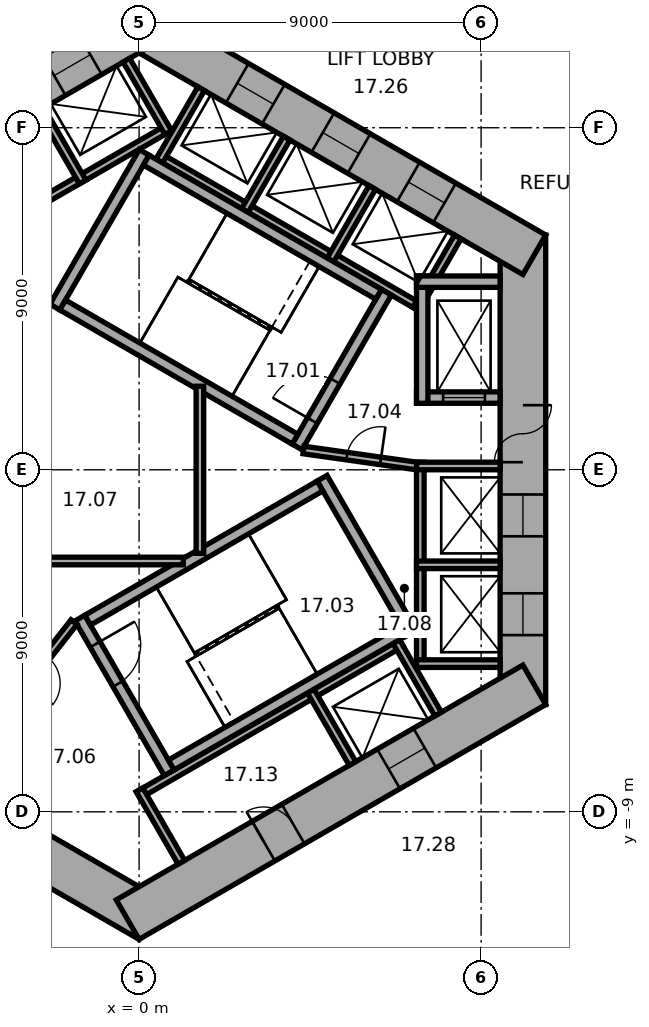
"""IFC4 building model, lengths in metres.
Left out: names, types, materials, properties, quantities, classifications, styles, units other than length and angle.
Written with IfcOpenShell. Run it as: python <this file> out.ifc"""

import sys

from ifc_helpers import new_model, si_unit, direction, frame, frame_2d, origin, place, context, subcontext, project, spatial, rectangle, extrude, element, fill, save


model = new_model("IFC4")
c1 = context("Model", 3, precision=1e-05, world=origin(), true_north=direction((0.0, 1.0)))
c2 = subcontext(c1, "Body", "Model", "MODEL_VIEW")
j1 = project(units=[si_unit("LENGTHUNIT", "METRE"), si_unit("PLANEANGLEUNIT", "RADIAN")], contexts=[c1])
p1 = place(None, origin())
s1 = spatial("IfcSite", under=j1, at=p1, CompositionType="ELEMENT")
p2 = place(p1, origin())
s2 = spatial("IfcBuilding", under=s1, at=p2, CompositionType="ELEMENT")
p3 = place(p2, frame((0.0, 0.0, 77.0)))
s3 = spatial("IfcBuildingStorey", under=s2, at=p3, CompositionType="ELEMENT", Elevation=77.0)
p4 = place(p3, frame((10.1, -6.177, 0.0), z_axis=(0.0, 0.0, 1.0), x_axis=(0.0, 1.0, 0.0)))
e1 = element("IfcWall", 1, at=p4, inside=s3, PredefinedType="SHEAR", context=c2, shape_type="SweptSolid", body=[
    extrude(rectangle(XDim=12.355, YDim=1.2, at=frame_2d((6.177, 0.0))), origin(), (0.0, 0.0, 1.0), 6.6),
])
p5 = place(p4, frame((6.378, 0.0, 0.0)))
e2 = element("IfcOpeningElement", 2, at=p5, cuts=e1, PredefinedType="OPENING", context=c2, shape_type="SweptSolid", body=[
    extrude(rectangle(XDim=1.5, YDim=2.1, at=frame_2d((0.75, 1.05))), frame((0.0, 0.61, 0.0), z_axis=(0.0, -1.0, 0.0), x_axis=(1.0, 0.0, 0.0)), (0.0, 0.0, 1.0), 1.22),
])
p6 = place(p4, frame((1.828, 0.0, 0.0)))
e3 = element("IfcOpeningElement", 3, at=p6, cuts=e1, PredefinedType="OPENING", context=c2, shape_type="SweptSolid", body=[
    extrude(rectangle(XDim=1.1, YDim=2.1, at=frame_2d((0.55, 1.05))), frame((0.0, 0.61, 0.0), z_axis=(0.0, -1.0, 0.0), x_axis=(1.0, 0.0, 0.0)), (0.0, 0.0, 1.0), 1.22),
])
p7 = place(p4, frame((4.427, 0.0, 0.0)))
e4 = element("IfcOpeningElement", 4, at=p7, cuts=e1, PredefinedType="OPENING", context=c2, shape_type="SweptSolid", body=[
    extrude(rectangle(XDim=1.1, YDim=2.1, at=frame_2d((0.55, 1.05))), frame((0.0, 0.61, 0.0), z_axis=(0.0, -1.0, 0.0), x_axis=(1.0, 0.0, 0.0)), (0.0, 0.0, 1.0), 1.22),
])
p8 = place(p3, frame((10.4, 5.658, 0.0), z_axis=(0.0, 0.0, 1.0), x_axis=(-0.866021384402, 0.500006961711, 0.0)))
e5 = element("IfcWall", 5, at=p8, inside=s3, PredefinedType="SHEAR", context=c2, shape_type="SweptSolid", body=[
    extrude(rectangle(XDim=12.355, YDim=1.2, at=frame_2d((6.178, 0.0))), origin(), (0.0, 0.0, 1.0), 6.6),
])
p9 = place(p8, frame((2.728, 0.0, 0.0)))
e6 = element("IfcOpeningElement", 6, at=p9, cuts=e5, PredefinedType="OPENING", context=c2, shape_type="SweptSolid", body=[
    extrude(rectangle(XDim=1.1, YDim=2.1, at=frame_2d((0.55, 1.05))), frame((0.0, 0.61, 0.0), z_axis=(0.0, -1.0, 0.0), x_axis=(1.0, 0.0, 0.0)), (0.0, 0.0, 1.0), 1.22),
])
p10 = place(p8, frame((5.328, 0.0, 0.0)))
e7 = element("IfcOpeningElement", 7, at=p10, cuts=e5, PredefinedType="OPENING", context=c2, shape_type="SweptSolid", body=[
    extrude(rectangle(XDim=1.1, YDim=2.1, at=frame_2d((0.55, 1.05))), frame((0.0, 0.61, 0.0), z_axis=(0.0, -1.0, 0.0), x_axis=(1.0, 0.0, 0.0)), (0.0, 0.0, 1.0), 1.22),
])
p11 = place(p8, frame((7.928, 0.0, 0.0)))
e8 = element("IfcOpeningElement", 8, at=p11, cuts=e5, PredefinedType="OPENING", context=c2, shape_type="SweptSolid", body=[
    extrude(rectangle(XDim=1.1, YDim=2.1, at=frame_2d((0.55, 1.05))), frame((0.0, 0.61, 0.0), z_axis=(0.0, -1.0, 0.0), x_axis=(1.0, 0.0, 0.0)), (0.0, 0.0, 1.0), 1.22),
])
p12 = place(p3, frame((0.3, 11.836, 0.0), z_axis=(0.0, 0.0, 1.0), x_axis=(-0.866021384402, -0.500006961711, 0.0)))
e9 = element("IfcWall", 9, at=p12, inside=s3, PredefinedType="SHEAR", context=c2, shape_type="SweptSolid", body=[
    extrude(rectangle(XDim=12.355, YDim=1.2, at=frame_2d((6.178, 0.0))), origin(), (0.0, 0.0, 1.0), 6.6),
])
p13 = place(p12, frame((6.378, 0.0, 0.0)))
e10 = element("IfcOpeningElement", 10, at=p13, cuts=e9, PredefinedType="OPENING", context=c2, shape_type="SweptSolid", body=[
    extrude(rectangle(XDim=1.5, YDim=2.1, at=frame_2d((0.75, 1.05))), frame((0.0, 0.61, 0.0), z_axis=(0.0, -1.0, 0.0), x_axis=(1.0, 0.0, 0.0)), (0.0, 0.0, 1.0), 1.22),
])
p14 = place(p12, frame((1.828, 0.0, 0.0)))
e11 = element("IfcOpeningElement", 11, at=p14, cuts=e9, PredefinedType="OPENING", context=c2, shape_type="SweptSolid", body=[
    extrude(rectangle(XDim=1.1, YDim=2.1, at=frame_2d((0.55, 1.05))), frame((0.0, 0.61, 0.0), z_axis=(0.0, -1.0, 0.0), x_axis=(1.0, 0.0, 0.0)), (0.0, 0.0, 1.0), 1.22),
])
p15 = place(p3, frame((-10.4, -5.658, 0.0), z_axis=(0.0, 0.0, 1.0), x_axis=(0.866021384402, -0.500006961711, 0.0)))
e12 = element("IfcWall", 12, at=p15, inside=s3, PredefinedType="SHEAR", context=c2, shape_type="SweptSolid", body=[
    extrude(rectangle(XDim=12.355, YDim=1.2, at=frame_2d((6.178, 0.0))), origin(), (0.0, 0.0, 1.0), 6.6),
])
p16 = place(p15, frame((6.378, 0.0, 0.0)))
e13 = element("IfcOpeningElement", 13, at=p16, cuts=e12, PredefinedType="OPENING", context=c2, shape_type="SweptSolid", body=[
    extrude(rectangle(XDim=1.5, YDim=2.1, at=frame_2d((0.75, 1.05))), frame((0.0, 0.61, 0.0), z_axis=(0.0, -1.0, 0.0), x_axis=(1.0, 0.0, 0.0)), (0.0, 0.0, 1.0), 1.22),
])
p17 = place(p15, frame((1.928, 0.0, 0.0)))
e14 = element("IfcOpeningElement", 14, at=p17, cuts=e12, PredefinedType="OPENING", context=c2, shape_type="SweptSolid", body=[
    extrude(rectangle(XDim=0.9, YDim=2.1, at=frame_2d((0.45, 1.05))), frame((0.0, 0.61, 0.0), z_axis=(0.0, -1.0, 0.0), x_axis=(1.0, 0.0, 0.0)), (0.0, 0.0, 1.0), 1.22),
])
p18 = place(p15, frame((4.528, 0.0, 0.0)))
e15 = element("IfcOpeningElement", 15, at=p18, cuts=e12, PredefinedType="OPENING", context=c2, shape_type="SweptSolid", body=[
    extrude(rectangle(XDim=0.9, YDim=2.1, at=frame_2d((0.45, 1.05))), frame((0.0, 0.61, 0.0), z_axis=(0.0, -1.0, 0.0), x_axis=(1.0, 0.0, 0.0)), (0.0, 0.0, 1.0), 1.22),
])
p19 = place(p3, frame((-0.3, -11.836, 0.0), z_axis=(0.0, 0.0, 1.0), x_axis=(0.866021384402, 0.500006961711, 0.0)))
e16 = element("IfcWall", 16, at=p19, inside=s3, PredefinedType="SHEAR", context=c2, shape_type="SweptSolid", body=[
    extrude(rectangle(XDim=12.355, YDim=1.2, at=frame_2d((6.178, 0.0))), origin(), (0.0, 0.0, 1.0), 6.6),
])
p20 = place(p19, frame((4.128, 0.0, 0.0)))
e17 = element("IfcOpeningElement", 17, at=p20, cuts=e16, PredefinedType="OPENING", context=c2, shape_type="SweptSolid", body=[
    extrude(rectangle(XDim=0.9, YDim=2.1, at=frame_2d((0.45, 1.05))), frame((0.0, 0.61, 0.0), z_axis=(0.0, -1.0, 0.0), x_axis=(1.0, 0.0, 0.0)), (0.0, 0.0, 1.0), 1.22),
])
p21 = place(p19, frame((7.928, 0.0, 0.0)))
e18 = element("IfcOpeningElement", 18, at=p21, cuts=e16, PredefinedType="OPENING", context=c2, shape_type="SweptSolid", body=[
    extrude(rectangle(XDim=1.1, YDim=2.1, at=frame_2d((0.55, 1.05))), frame((0.0, 0.61, 0.0), z_axis=(0.0, -1.0, 0.0), x_axis=(1.0, 0.0, 0.0)), (0.0, 0.0, 1.0), 1.22),
])
p22 = place(p3, frame((0.113, 18.297, 0.0), z_axis=(0.0, 0.0, 1.0), x_axis=(0.894932628477, -0.446201289204, 0.0)))
e19 = element("IfcWall", 19, at=p22, inside=s3, PredefinedType="STANDARD", context=c2, shape_type="SweptSolid", body=[
    extrude(rectangle(XDim=17.659, YDim=0.15, at=frame_2d((8.83, 0.0))), origin(), (0.0, 0.0, 1.0), 2.6),
])
p23 = place(p22, frame((3.515, 0.0, 0.0)))
e20 = element("IfcOpeningElement", 20, at=p23, cuts=e19, PredefinedType="OPENING", context=c2, shape_type="SweptSolid", body=[
    extrude(rectangle(XDim=1.8, YDim=2.4, at=frame_2d((0.9, 1.2))), frame((0.0, 0.085, 0.0), z_axis=(0.0, -1.0, 0.0), x_axis=(1.0, 0.0, 0.0)), (0.0, 0.0, 1.0), 0.17),
])
p24 = place(p22, frame((12.344, 0.0, 0.0)))
e21 = element("IfcOpeningElement", 21, at=p24, cuts=e19, PredefinedType="OPENING", context=c2, shape_type="SweptSolid", body=[
    extrude(rectangle(XDim=1.8, YDim=2.4, at=frame_2d((0.9, 1.2))), frame((0.0, 0.085, 0.0), z_axis=(0.0, -1.0, 0.0), x_axis=(1.0, 0.0, 0.0)), (0.0, 0.0, 1.0), 0.17),
])
p25 = place(p3, frame((7.4, -5.2, 0.0), z_axis=(0.0, 0.0, 1.0), x_axis=(0.0, 1.0, 0.0)))
e22 = element("IfcWall", 22, at=p25, inside=s3, PredefinedType="PARTITIONING", context=c2, shape_type="SweptSolid", body=[
    extrude(rectangle(XDim=5.4, YDim=0.2, at=frame_2d((2.7, 0.0))), origin(), (0.0, 0.0, 1.0), 6.35),
])
for number, where, z_axis, x_axis in (
    (23, (7.3, -5.1, 0.0), (0.0, 0.0, 1.0), (1.0, 0.0, 0.0)),
    (24, (7.3, -2.5, 0.0), (0.0, 0.0, 1.0), (1.0, 0.0, 0.0)),
    (25, (7.3, 0.1, 0.0), (0.0, 0.0, 1.0), (1.0, 0.0, 0.0)),
):
    element("IfcWall", number, at=place(p3, frame(where, z_axis=z_axis, x_axis=x_axis)), inside=s3, PredefinedType="PARTITIONING", context=c2, shape_type="SweptSolid", body=[
        extrude(rectangle(XDim=2.2, YDim=0.2, at=frame_2d((1.1, 0.0))), origin(), (0.0, 0.0, 1.0), 6.35),
    ])
p26 = place(p3, frame((7.424, 4.259, 0.0), z_axis=(0.0, 0.0, 1.0), x_axis=(-0.866026010844, 0.49999894854, 0.0)))
e26 = element("IfcWall", 26, at=p26, inside=s3, PredefinedType="PARTITIONING", context=c2, shape_type="SweptSolid", body=[
    extrude(rectangle(XDim=8.0, YDim=0.2, at=frame_2d((4.0, 0.0))), origin(), (0.0, 0.0, 1.0), 6.35),
])
for number, where, z_axis, x_axis in (
    (27, (7.287, 4.222, 0.0), (0.0, 0.0, 1.0), (0.5, 0.866, 0.0)),
    (28, (5.036, 5.522, 0.0), (0.0, 0.0, 1.0), (0.5, 0.866, 0.0)),
    (29, (2.784, 6.822, 0.0), (0.0, 0.0, 1.0), (0.5, 0.866, 0.0)),
    (30, (0.532, 8.122, 0.0), (0.0, 0.0, 1.0), (0.5, 0.866, 0.0)),
):
    element("IfcWall", number, at=place(p3, frame(where, z_axis=z_axis, x_axis=x_axis)), inside=s3, PredefinedType="PARTITIONING", context=c2, shape_type="SweptSolid", body=[
        extrude(rectangle(XDim=2.2, YDim=0.2, at=frame_2d((1.1, 0.0))), origin(), (0.0, 0.0, 1.0), 6.35),
    ])
p27 = place(p3, frame((0.803, 9.009, 0.0), z_axis=(0.0, 0.0, 1.0), x_axis=(-0.866028230842, -0.499995103361, 0.0)))
e31 = element("IfcWall", 31, at=p27, inside=s3, PredefinedType="PARTITIONING", context=c2, shape_type="SweptSolid", body=[
    extrude(rectangle(XDim=5.4, YDim=0.2, at=frame_2d((2.7, 0.0))), origin(), (0.0, 0.0, 1.0), 6.35),
])
p28 = place(p3, frame((0.767, 8.872, 0.0), z_axis=(0.0, 0.0, 1.0), x_axis=(-0.499994660107, 0.866028486751, 0.0)))
e32 = element("IfcWall", 32, at=p28, inside=s3, PredefinedType="PARTITIONING", context=c2, shape_type="SweptSolid", body=[
    extrude(rectangle(XDim=2.2, YDim=0.2, at=frame_2d((1.1, 0.0))), origin(), (0.0, 0.0, 1.0), 6.35),
])
p29 = place(p3, frame((-1.485, 7.572, 0.0), z_axis=(0.0, 0.0, 1.0), x_axis=(-0.50002983664, 0.866008176907, 0.0)))
e33 = element("IfcWall", 33, at=p29, inside=s3, PredefinedType="PARTITIONING", context=c2, shape_type="SweptSolid", body=[
    extrude(rectangle(XDim=2.2, YDim=0.2, at=frame_2d((1.1, 0.0))), origin(), (0.0, 0.0, 1.0), 6.35),
])
p30 = place(p3, frame((-0.024, -8.559, 0.0), z_axis=(0.0, 0.0, 1.0), x_axis=(0.866026010844, 0.49999894854, 0.0)))
e34 = element("IfcWall", 34, at=p30, inside=s3, PredefinedType="PARTITIONING", context=c2, shape_type="SweptSolid", body=[
    extrude(rectangle(XDim=8.0, YDim=0.2, at=frame_2d((4.0, 0.0))), origin(), (0.0, 0.0, 1.0), 6.35),
])
for number, where, z_axis, x_axis in (
    (35, (0.013, -8.422, 0.0), (0.0, 0.0, 1.0), (0.5, -0.866, 0.0)),
    (36, (4.516, -5.822, 0.0), (0.0, 0.0, 1.0), (0.5, -0.866, 0.0)),
    (37, (6.768, -4.522, 0.0), (0.0, 0.0, 1.0), (0.5, -0.866, 0.0)),
):
    element("IfcWall", number, at=place(p3, frame(where, z_axis=z_axis, x_axis=x_axis)), inside=s3, PredefinedType="PARTITIONING", context=c2, shape_type="SweptSolid", body=[
        extrude(rectangle(XDim=2.2, YDim=0.2, at=frame_2d((1.1, 0.0))), origin(), (0.0, 0.0, 1.0), 6.35),
    ])
p31 = place(p3, frame((4.158, 0.602, 0.0), z_axis=(0.0, 0.0, 1.0), x_axis=(0.499977259774, 0.866038532462, 0.0)))
e38 = element("IfcWall", 38, at=p31, inside=s3, PredefinedType="SHEAR", context=c2, shape_type="SweptSolid", body=[
    extrude(rectangle(XDim=4.7, YDim=0.3, at=frame_2d((2.35, 0.0))), origin(), (0.0, 0.0, 1.0), 6.35),
])
p32 = place(p31, frame((0.8, 0.0, 0.0)))
e39 = element("IfcOpeningElement", 39, at=p32, cuts=e38, PredefinedType="OPENING", context=c2, shape_type="SweptSolid", body=[
    extrude(rectangle(XDim=1.2, YDim=2.1, at=frame_2d((0.6, 1.05))), frame((0.0, 0.16, 0.0), z_axis=(0.0, -1.0, 0.0), x_axis=(1.0, 0.0, 0.0)), (0.0, 0.0, 1.0), 0.32),
])
p33 = place(p3, frame((-2.216, 4.282, 0.0), z_axis=(0.0, 0.0, 1.0), x_axis=(0.499977259774, 0.866038532462, 0.0)))
e40 = element("IfcWall", 40, at=p33, inside=s3, PredefinedType="SHEAR", context=c2, shape_type="SweptSolid", body=[
    extrude(rectangle(XDim=4.7, YDim=0.3, at=frame_2d((2.35, 0.0))), origin(), (0.0, 0.0, 1.0), 6.35),
])
for number, where, z_axis, x_axis in (
    (41, (4.103, 0.807, 0.0), (0.0, 0.0, 1.0), (-0.866, 0.5, 0.0)),
    (42, (6.303, 4.617, 0.0), (0.0, 0.0, 1.0), (-0.866, 0.5, 0.0)),
):
    element("IfcWall", number, at=place(p3, frame(where, z_axis=z_axis, x_axis=x_axis)), inside=s3, PredefinedType="SHEAR", context=c2, shape_type="SweptSolid", body=[
        extrude(rectangle(XDim=7.06, YDim=0.3, at=frame_2d((3.53, 0.0))), origin(), (0.0, 0.0, 1.0), 6.35),
    ])
p34 = place(p3, frame((-1.558, -3.902, 0.0), z_axis=(0.0, 0.0, 1.0), x_axis=(0.499977259774, -0.866038532462, 0.0)))
e43 = element("IfcWall", 43, at=p34, inside=s3, PredefinedType="SHEAR", context=c2, shape_type="SweptSolid", body=[
    extrude(rectangle(XDim=4.7, YDim=0.3, at=frame_2d((2.35, 0.0))), origin(), (0.0, 0.0, 1.0), 6.35),
])
p35 = place(p34, frame((0.8, 0.0, 0.0)))
e44 = element("IfcOpeningElement", 44, at=p35, cuts=e43, PredefinedType="OPENING", context=c2, shape_type="SweptSolid", body=[
    extrude(rectangle(XDim=1.2, YDim=2.1, at=frame_2d((0.6, 1.05))), frame((0.0, 0.16, 0.0), z_axis=(0.0, -1.0, 0.0), x_axis=(1.0, 0.0, 0.0)), (0.0, 0.0, 1.0), 0.32),
])
p36 = place(p3, frame((4.816, -0.222, 0.0), z_axis=(0.0, 0.0, 1.0), x_axis=(0.499977259774, -0.866038532462, 0.0)))
e45 = element("IfcWall", 45, at=p36, inside=s3, PredefinedType="SHEAR", context=c2, shape_type="SweptSolid", body=[
    extrude(rectangle(XDim=4.7, YDim=0.3, at=frame_2d((2.35, 0.0))), origin(), (0.0, 0.0, 1.0), 6.35),
])
for number, where, z_axis, x_axis in (
    (46, (-1.353, -3.957, 0.0), (0.0, 0.0, 1.0), (0.866, 0.5, 0.0)),
    (47, (0.847, -7.767, 0.0), (0.0, 0.0, 1.0), (0.866, 0.5, 0.0)),
):
    element("IfcWall", number, at=place(p3, frame(where, z_axis=z_axis, x_axis=x_axis)), inside=s3, PredefinedType="SHEAR", context=c2, shape_type="SweptSolid", body=[
        extrude(rectangle(XDim=7.06, YDim=0.3, at=frame_2d((3.53, 0.0))), origin(), (0.0, 0.0, 1.0), 6.35),
    ])
p37 = place(p3, frame((7.3, 1.9, 0.0), z_axis=(0.0, 0.0, 1.0), x_axis=(1.0, 0.0, 0.0)))
e48 = element("IfcWall", 48, at=p37, inside=s3, PredefinedType="SHEAR", context=c2, shape_type="SweptSolid", body=[
    extrude(rectangle(XDim=2.2, YDim=0.3, at=frame_2d((1.1, 0.0))), origin(), (0.0, 0.0, 1.0), 6.35),
])
p38 = place(p37, frame((0.7, 0.0, 0.0)))
e49 = element("IfcOpeningElement", 49, at=p38, cuts=e48, PredefinedType="OPENING", context=c2, shape_type="SweptSolid", body=[
    extrude(rectangle(XDim=1.1, YDim=2.1, at=frame_2d((0.55, 1.05))), frame((0.0, 0.16, 0.0), z_axis=(0.0, -1.0, 0.0), x_axis=(1.0, 0.0, 0.0)), (0.0, 0.0, 1.0), 0.32),
])
p39 = place(p3, frame((7.45, 1.75, 0.0), z_axis=(0.0, 0.0, 1.0), x_axis=(0.0, 1.0, 0.0)))
e50 = element("IfcWall", 50, at=p39, inside=s3, PredefinedType="SHEAR", context=c2, shape_type="SweptSolid", body=[
    extrude(rectangle(XDim=3.35, YDim=0.3, at=frame_2d((1.675, 0.0))), origin(), (0.0, 0.0, 1.0), 6.35),
])
p40 = place(p3, frame((7.3, 4.95, 0.0), z_axis=(0.0, 0.0, 1.0), x_axis=(1.0, 0.0, 0.0)))
e51 = element("IfcWall", 51, at=p40, inside=s3, PredefinedType="SHEAR", context=c2, shape_type="SweptSolid", body=[
    extrude(rectangle(XDim=2.2, YDim=0.3, at=frame_2d((1.1, 0.0))), origin(), (0.0, 0.0, 1.0), 6.35),
])
p41 = place(p3, frame((4.327, 0.521, 0.0), z_axis=(0.0, 0.0, 1.0), x_axis=(0.990124376366, -0.14019172346, 0.0)))
e52 = element("IfcWall", 52, at=p41, inside=s3, PredefinedType="PARTITIONING", context=c2, shape_type="SweptSolid", body=[
    extrude(rectangle(XDim=3.002, YDim=0.2, at=frame_2d((1.501, 0.0))), origin(), (0.0, 0.0, 1.0), 6.35),
])
p42 = place(p41, frame((1.15, 0.0, 0.0)))
e53 = element("IfcOpeningElement", 53, at=p42, cuts=e52, PredefinedType="OPENING", context=c2, shape_type="SweptSolid", body=[
    extrude(rectangle(XDim=0.9, YDim=2.1, at=frame_2d((0.45, 1.05))), frame((0.0, 0.11, 0.0), z_axis=(0.0, -1.0, 0.0), x_axis=(1.0, 0.0, 0.0)), (0.0, 0.0, 1.0), 0.22),
])
p43 = place(p3, frame((-1.712, -4.008, 0.0), z_axis=(0.0, 0.0, 1.0), x_axis=(-0.616549420702, -0.787316208287, 0.0)))
e54 = element("IfcWall", 54, at=p43, inside=s3, PredefinedType="PARTITIONING", context=c2, shape_type="SweptSolid", body=[
    extrude(rectangle(XDim=3.002, YDim=0.2, at=frame_2d((1.501, 0.0))), origin(), (0.0, 0.0, 1.0), 6.35),
])
p44 = place(p43, frame((1.15, 0.0, 0.0)))
e55 = element("IfcOpeningElement", 55, at=p44, cuts=e54, PredefinedType="OPENING", context=c2, shape_type="SweptSolid", body=[
    extrude(rectangle(XDim=0.9, YDim=2.1, at=frame_2d((0.45, 1.05))), frame((0.0, 0.11, 0.0), z_axis=(0.0, -1.0, 0.0), x_axis=(1.0, 0.0, 0.0)), (0.0, 0.0, 1.0), 0.22),
])
p45 = place(p3, frame((-2.72, -2.4, 0.0), z_axis=(0.0, 0.0, 1.0), x_axis=(1.0, 0.0, 0.0)))
e56 = element("IfcWall", 56, at=p45, inside=s3, PredefinedType="PARTITIONING", context=c2, shape_type="SweptSolid", body=[
    extrude(rectangle(XDim=3.883, YDim=0.2, at=frame_2d((1.941, 0.0))), origin(), (0.0, 0.0, 1.0), 6.35),
])
p46 = place(p3, frame((1.6, -2.198, 0.0), z_axis=(0.0, 0.0, 1.0), x_axis=(0.0, 1.0, 0.0)))
e57 = element("IfcWall", 57, at=p46, inside=s3, PredefinedType="PARTITIONING", context=c2, shape_type="SweptSolid", body=[
    extrude(rectangle(XDim=4.397, YDim=0.2, at=frame_2d((2.198, 0.0))), origin(), (0.0, 0.0, 1.0), 6.35),
])
p47 = place(p5, origin())
e58 = element("IfcDoor", 58, at=p47, inside=s3, OperationType="DOUBLE_DOOR_SINGLE_SWING", PredefinedType="DOOR", context=c2, shape_type="SweptSolid", body=[
    extrude(rectangle(XDim=1.5, YDim=2.1, at=frame_2d((0.75, 1.05))), frame((0.0, 0.025, 0.0), z_axis=(0.0, -1.0, 0.0), x_axis=(1.0, 0.0, 0.0)), (0.0, 0.0, 1.0), 0.05),
])
fill(e2, e58)
p48 = place(p32, origin())
e59 = element("IfcDoor", 59, at=p48, inside=s3, OperationType="SINGLE_SWING_RIGHT", PredefinedType="DOOR", context=c2, shape_type="SweptSolid", body=[
    extrude(rectangle(XDim=1.2, YDim=2.1, at=frame_2d((0.6, 1.05))), frame((0.0, 0.025, 0.0), z_axis=(0.0, -1.0, 0.0), x_axis=(1.0, 0.0, 0.0)), (0.0, 0.0, 1.0), 0.05),
])
fill(e39, e59)
p49 = place(p35, origin())
e60 = element("IfcDoor", 60, at=p49, inside=s3, OperationType="SINGLE_SWING_RIGHT", PredefinedType="DOOR", context=c2, shape_type="SweptSolid", body=[
    extrude(rectangle(XDim=1.2, YDim=2.1, at=frame_2d((0.6, 1.05))), frame((0.0, 0.025, 0.0), z_axis=(0.0, -1.0, 0.0), x_axis=(1.0, 0.0, 0.0)), (0.0, 0.0, 1.0), 0.05),
])
fill(e44, e60)
p50 = place(p42, origin())
e61 = element("IfcDoor", 61, at=p50, inside=s3, OperationType="SINGLE_SWING_LEFT", PredefinedType="DOOR", context=c2, shape_type="SweptSolid", body=[
    extrude(rectangle(XDim=0.9, YDim=2.1, at=frame_2d((0.45, 1.05))), frame((0.0, 0.025, 0.0), z_axis=(0.0, -1.0, 0.0), x_axis=(1.0, 0.0, 0.0)), (0.0, 0.0, 1.0), 0.05),
])
fill(e53, e61)
p51 = place(p20, origin())
e62 = element("IfcDoor", 62, at=p51, inside=s3, OperationType="SINGLE_SWING_LEFT", PredefinedType="DOOR", context=c2, shape_type="SweptSolid", body=[
    extrude(rectangle(XDim=0.9, YDim=2.1, at=frame_2d((0.45, 1.05))), frame((0.0, 0.025, 0.0), z_axis=(0.0, -1.0, 0.0), x_axis=(1.0, 0.0, 0.0)), (0.0, 0.0, 1.0), 0.05),
])
fill(e17, e62)
p52 = place(p38, origin())
e63 = element("IfcDoor", 63, at=p52, inside=s3, OperationType="DOUBLE_DOOR_SLIDING", PredefinedType="DOOR", context=c2, shape_type="SweptSolid", body=[
    extrude(rectangle(XDim=1.1, YDim=2.1, at=frame_2d((0.55, 1.05))), frame((0.0, 0.025, 0.0), z_axis=(0.0, -1.0, 0.0), x_axis=(1.0, 0.0, 0.0)), (0.0, 0.0, 1.0), 0.05),
])
fill(e49, e63)
p53 = place(p6, origin())
e64 = element("IfcDoor", 64, at=p53, inside=s3, OperationType="DOUBLE_DOOR_SLIDING", PredefinedType="DOOR", context=c2, shape_type="SweptSolid", body=[
    extrude(rectangle(XDim=1.1, YDim=2.1, at=frame_2d((0.55, 1.05))), frame((0.0, 0.025, 0.0), z_axis=(0.0, -1.0, 0.0), x_axis=(1.0, 0.0, 0.0)), (0.0, 0.0, 1.0), 0.05),
])
fill(e3, e64)
p54 = place(p7, origin())
e65 = element("IfcDoor", 65, at=p54, inside=s3, OperationType="DOUBLE_DOOR_SLIDING", PredefinedType="DOOR", context=c2, shape_type="SweptSolid", body=[
    extrude(rectangle(XDim=1.1, YDim=2.1, at=frame_2d((0.55, 1.05))), frame((0.0, 0.025, 0.0), z_axis=(0.0, -1.0, 0.0), x_axis=(1.0, 0.0, 0.0)), (0.0, 0.0, 1.0), 0.05),
])
fill(e4, e65)
p55 = place(p9, origin())
e66 = element("IfcDoor", 66, at=p55, inside=s3, OperationType="DOUBLE_DOOR_SLIDING", PredefinedType="DOOR", context=c2, shape_type="SweptSolid", body=[
    extrude(rectangle(XDim=1.1, YDim=2.1, at=frame_2d((0.55, 1.05))), frame((0.0, 0.025, 0.0), z_axis=(0.0, -1.0, 0.0), x_axis=(1.0, 0.0, 0.0)), (0.0, 0.0, 1.0), 0.05),
])
fill(e6, e66)
p56 = place(p10, origin())
e67 = element("IfcDoor", 67, at=p56, inside=s3, OperationType="DOUBLE_DOOR_SLIDING", PredefinedType="DOOR", context=c2, shape_type="SweptSolid", body=[
    extrude(rectangle(XDim=1.1, YDim=2.1, at=frame_2d((0.55, 1.05))), frame((0.0, 0.025, 0.0), z_axis=(0.0, -1.0, 0.0), x_axis=(1.0, 0.0, 0.0)), (0.0, 0.0, 1.0), 0.05),
])
fill(e7, e67)
p57 = place(p11, origin())
e68 = element("IfcDoor", 68, at=p57, inside=s3, OperationType="DOUBLE_DOOR_SLIDING", PredefinedType="DOOR", context=c2, shape_type="SweptSolid", body=[
    extrude(rectangle(XDim=1.1, YDim=2.1, at=frame_2d((0.55, 1.05))), frame((0.0, 0.025, 0.0), z_axis=(0.0, -1.0, 0.0), x_axis=(1.0, 0.0, 0.0)), (0.0, 0.0, 1.0), 0.05),
])
fill(e8, e68)
p58 = place(p14, origin())
e69 = element("IfcDoor", 69, at=p58, inside=s3, OperationType="DOUBLE_DOOR_SLIDING", PredefinedType="DOOR", context=c2, shape_type="SweptSolid", body=[
    extrude(rectangle(XDim=1.1, YDim=2.1, at=frame_2d((0.55, 1.05))), frame((0.0, 0.025, 0.0), z_axis=(0.0, -1.0, 0.0), x_axis=(1.0, 0.0, 0.0)), (0.0, 0.0, 1.0), 0.05),
])
fill(e11, e69)
p59 = place(p21, origin())
e70 = element("IfcDoor", 70, at=p59, inside=s3, OperationType="DOUBLE_DOOR_SLIDING", PredefinedType="DOOR", context=c2, shape_type="SweptSolid", body=[
    extrude(rectangle(XDim=1.1, YDim=2.1, at=frame_2d((0.55, 1.05))), frame((0.0, 0.025, 0.0), z_axis=(0.0, -1.0, 0.0), x_axis=(1.0, 0.0, 0.0)), (0.0, 0.0, 1.0), 0.05),
])
fill(e18, e70)
save(model, sys.argv[1])
